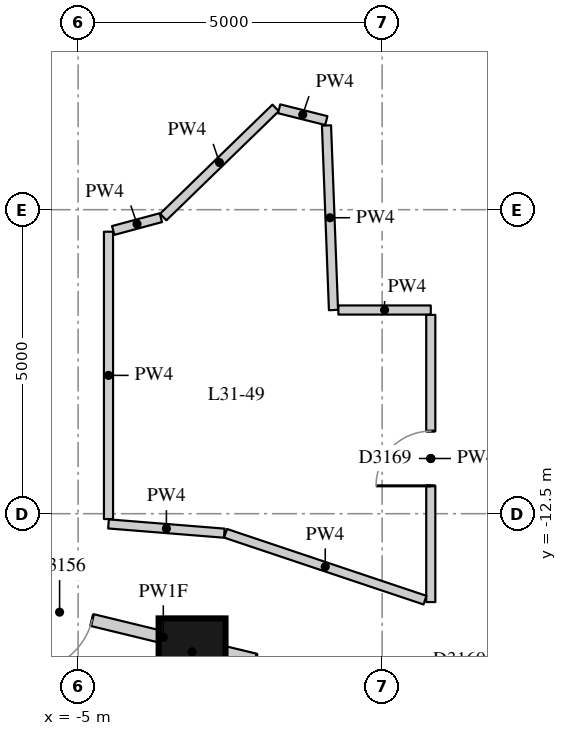
"""IFC4 building model, lengths in metres.
Left out: names, types, materials, properties, quantities, classifications, styles, units other than length and angle.
Written with IfcOpenShell. Run it as: python <this file> out.ifc"""

import sys

from ifc_helpers import new_model, si_unit, direction, frame, frame_2d, origin, origin_2d, place, context, subcontext, project, spatial, rectangle, extrude, element, fill, save


model = new_model("IFC4")
c1 = context("Model", 3, precision=1e-05, world=origin(), true_north=direction((0.0, 1.0)))
c2 = subcontext(c1, "Body", "Model", "MODEL_VIEW")
j1 = project(units=[si_unit("LENGTHUNIT", "METRE"), si_unit("PLANEANGLEUNIT", "RADIAN")], contexts=[c1])
p1 = place(None, origin())
s1 = spatial("IfcSite", under=j1, at=p1, CompositionType="ELEMENT")
p2 = place(p1, origin())
s2 = spatial("IfcBuilding", under=s1, at=p2, CompositionType="ELEMENT")
p3 = place(p2, frame((0.0, 0.0, 112.0)))
s3 = spatial("IfcBuildingStorey", under=s2, at=p3, CompositionType="ELEMENT", Elevation=112.0)
p4 = place(p3, frame((-3.126, -14.772, 0.0), z_axis=(0.0, 0.0, 1.0), x_axis=(1.0, 0.0, 0.0)))
e1 = element("IfcColumn", 1, at=p4, inside=s3, PredefinedType="COLUMN", context=c2, shape_type="SweptSolid", body=[
    extrude(rectangle(XDim=1.1, YDim=1.1, at=origin_2d()), origin(), (0.0, 0.0, 1.0), 3.3),
])
p5 = place(p3, frame((6.891, -14.625, 0.0), z_axis=(0.0, 0.0, 1.0), x_axis=(-0.987419134366, -0.158124802253, 0.0)))
e2 = element("IfcWall", 2, at=p5, inside=s3, PredefinedType="PARTITIONING", context=c2, shape_type="SweptSolid", body=[
    extrude(rectangle(XDim=6.168, YDim=0.2, at=frame_2d((3.084, 0.0))), origin(), (0.0, 0.0, 1.0), 2.42),
])
p6 = place(p5, frame((4.604, 0.0, 0.0)))
e3 = element("IfcOpeningElement", 3, at=p6, cuts=e2, PredefinedType="OPENING", context=c2, shape_type="SweptSolid", body=[
    extrude(rectangle(XDim=1.1, YDim=2.1, at=frame_2d((0.55, 1.05))), frame((0.0, 0.11, 0.0), z_axis=(0.0, -1.0, 0.0), x_axis=(1.0, 0.0, 0.0)), (0.0, 0.0, 1.0), 0.22),
])
p7 = place(p3, frame((0.702, -15.577, 0.0), z_axis=(0.0, 0.0, 1.0), x_axis=(-0.971804733873, 0.235787105715, 0.0)))
e4 = element("IfcWall", 4, at=p7, inside=s3, PredefinedType="PARTITIONING", context=c2, shape_type="SweptSolid", body=[
    extrude(rectangle(XDim=8.852, YDim=0.2, at=frame_2d((4.426, 0.0))), origin(), (0.0, 0.0, 1.0), 2.42),
])
p8 = place(p7, frame((5.631, 0.0, 0.0)))
e5 = element("IfcOpeningElement", 5, at=p8, cuts=e4, PredefinedType="OPENING", context=c2, shape_type="SweptSolid", body=[
    extrude(rectangle(XDim=1.1, YDim=2.1, at=frame_2d((0.55, 1.05))), frame((0.0, 0.11, 0.0), z_axis=(0.0, -1.0, 0.0), x_axis=(1.0, 0.0, 0.0)), (0.0, 0.0, 1.0), 0.22),
])
p9 = place(p7, frame((1.863, 0.0, 0.0)))
e6 = element("IfcOpeningElement", 6, at=p9, cuts=e4, PredefinedType="OPENING", context=c2, shape_type="SweptSolid", body=[
    extrude(rectangle(XDim=1.0, YDim=2.1, at=frame_2d((0.5, 1.05))), frame((0.0, 0.11, 0.0), z_axis=(0.0, -1.0, 0.0), x_axis=(1.0, 0.0, 0.0)), (0.0, 0.0, 1.0), 0.22),
])
p10 = place(p3, frame((-3.6, -7.621, 0.0), z_axis=(0.0, 0.0, 1.0), x_axis=(0.717359204099, 0.696703503862, 0.0)))
e7 = element("IfcWall", 7, at=p10, inside=s3, PredefinedType="PARTITIONING", context=c2, shape_type="SweptSolid", body=[
    extrude(rectangle(XDim=2.577, YDim=0.15, at=frame_2d((1.288, 0.0))), origin(), (0.0, 0.0, 1.0), 3.02),
])
p11 = place(p3, frame((-1.694, -5.84, 0.0), z_axis=(0.0, 0.0, 1.0), x_axis=(0.970106576928, -0.242679272705, 0.0)))
e8 = element("IfcWall", 8, at=p11, inside=s3, PredefinedType="PARTITIONING", context=c2, shape_type="SweptSolid", body=[
    extrude(rectangle(XDim=0.8, YDim=0.15, at=frame_2d((0.4, 0.0))), origin(), (0.0, 0.0, 1.0), 3.02),
])
p12 = place(p3, frame((-0.915, -6.115, 0.0), z_axis=(0.0, 0.0, 1.0), x_axis=(0.037855898917, -0.999283208564, 0.0)))
e9 = element("IfcWall", 9, at=p12, inside=s3, PredefinedType="PARTITIONING", context=c2, shape_type="SweptSolid", body=[
    extrude(rectangle(XDim=3.038, YDim=0.15, at=frame_2d((1.519, 0.0))), origin(), (0.0, 0.0, 1.0), 3.02),
])
p13 = place(p3, frame((-0.72, -9.15, 0.0), z_axis=(0.0, 0.0, 1.0), x_axis=(1.0, 0.0, 0.0)))
e10 = element("IfcWall", 10, at=p13, inside=s3, PredefinedType="PARTITIONING", context=c2, shape_type="SweptSolid", body=[
    extrude(rectangle(XDim=1.52, YDim=0.15, at=frame_2d((0.76, 0.0))), origin(), (0.0, 0.0, 1.0), 3.02),
])
p14 = place(p3, frame((0.8, -9.23, 0.0), z_axis=(0.0, 0.0, 1.0), x_axis=(0.0, -1.0, 0.0)))
e11 = element("IfcWall", 11, at=p14, inside=s3, PredefinedType="PARTITIONING", context=c2, shape_type="SweptSolid", body=[
    extrude(rectangle(XDim=4.724, YDim=0.15, at=frame_2d((2.362, 0.0))), origin(), (0.0, 0.0, 1.0), 3.02),
])
p15 = place(p14, frame((1.912, 0.0, 0.0)))
e12 = element("IfcOpeningElement", 12, at=p15, cuts=e11, PredefinedType="OPENING", context=c2, shape_type="SweptSolid", body=[
    extrude(rectangle(XDim=0.9, YDim=2.1, at=frame_2d((0.45, 1.05))), frame((0.0, 0.085, 0.0), z_axis=(0.0, -1.0, 0.0), x_axis=(1.0, 0.0, 0.0)), (0.0, 0.0, 1.0), 0.17),
])
p16 = place(p3, frame((0.705, -13.922, 0.0), z_axis=(0.0, 0.0, 1.0), x_axis=(-0.948131483463, 0.317878420258, 0.0)))
e13 = element("IfcWall", 13, at=p16, inside=s3, PredefinedType="PARTITIONING", context=c2, shape_type="SweptSolid", body=[
    extrude(rectangle(XDim=3.46, YDim=0.15, at=frame_2d((1.73, 0.0))), origin(), (0.0, 0.0, 1.0), 3.02),
])
p17 = place(p3, frame((-2.596, -12.82, 0.0), z_axis=(0.0, 0.0, 1.0), x_axis=(-0.996815278536, 0.079745222283, 0.0)))
e14 = element("IfcWall", 14, at=p17, inside=s3, PredefinedType="PARTITIONING", context=c2, shape_type="SweptSolid", body=[
    extrude(rectangle(XDim=1.91, YDim=0.15, at=frame_2d((0.955, 0.0))), origin(), (0.0, 0.0, 1.0), 3.02),
])
p18 = place(p3, frame((-4.5, -12.588, 0.0), z_axis=(0.0, 0.0, 1.0), x_axis=(0.0, 1.0, 0.0)))
e15 = element("IfcWall", 15, at=p18, inside=s3, PredefinedType="PARTITIONING", context=c2, shape_type="SweptSolid", body=[
    extrude(rectangle(XDim=4.726, YDim=0.15, at=frame_2d((2.363, 0.0))), origin(), (0.0, 0.0, 1.0), 3.02),
])
p19 = place(p3, frame((-4.423, -7.842, 0.0), z_axis=(0.0, 0.0, 1.0), x_axis=(0.96582447955, 0.259196980502, 0.0)))
e16 = element("IfcWall", 16, at=p19, inside=s3, PredefinedType="PARTITIONING", context=c2, shape_type="SweptSolid", body=[
    extrude(rectangle(XDim=0.812, YDim=0.15, at=frame_2d((0.406, 0.0))), origin(), (0.0, 0.0, 1.0), 3.02),
])
p20 = place(p3, frame((-4.073, -3.927, 0.0), z_axis=(0.0, 0.0, 1.0), x_axis=(-0.923860025149, -0.382730523909, 0.0)))
e17 = element("IfcWall", 17, at=p20, inside=s3, PredefinedType="PARTITIONING", context=c2, shape_type="SweptSolid", body=[
    extrude(rectangle(XDim=4.251, YDim=0.1, at=frame_2d((2.125, 0.0))), origin(), (0.0, 0.0, 1.0), 3.02),
])
p21 = place(p8, origin())
e18 = element("IfcDoor", 18, at=p21, inside=s3, OperationType="SINGLE_SWING_RIGHT", PredefinedType="DOOR", context=c2, shape_type="SweptSolid", body=[
    extrude(rectangle(XDim=1.1, YDim=2.1, at=frame_2d((0.55, 1.05))), frame((0.0, 0.025, 0.0), z_axis=(0.0, -1.0, 0.0), x_axis=(1.0, 0.0, 0.0)), (0.0, 0.0, 1.0), 0.05),
])
fill(e5, e18)
p22 = place(p15, origin())
e19 = element("IfcDoor", 19, at=p22, inside=s3, OperationType="SINGLE_SWING_LEFT", PredefinedType="DOOR", context=c2, shape_type="SweptSolid", body=[
    extrude(rectangle(XDim=0.9, YDim=2.1, at=frame_2d((0.45, 1.05))), frame((0.0, 0.025, 0.0), z_axis=(0.0, -1.0, 0.0), x_axis=(1.0, 0.0, 0.0)), (0.0, 0.0, 1.0), 0.05),
])
fill(e12, e19)
save(model, sys.argv[1])
